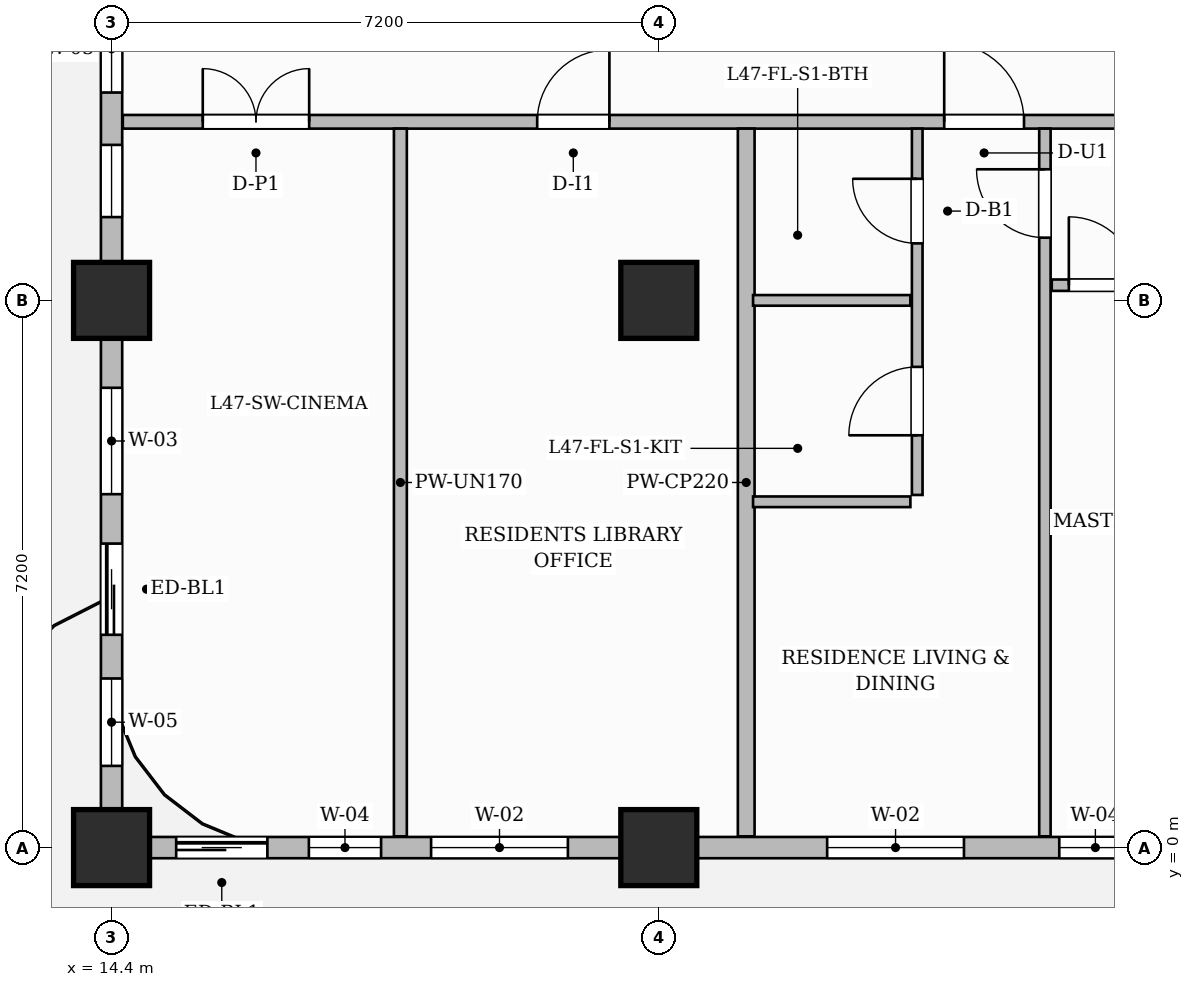
"""IFC4 building model, lengths in metres.
Left out: names, types, materials, properties, quantities, classifications, styles, units other than length and angle.
Written with IfcOpenShell. Run it as: python <this file> out.ifc"""

import sys

from ifc_helpers import new_model, si_unit, direction, frame, frame_2d, origin, origin_2d, place, context, subcontext, project, spatial, rectangle, extrude, source, transform, mapped, element, fill, save


model = new_model("IFC4")
c1 = context("Model", 3, precision=1e-05, world=origin(), true_north=direction((0.0, 1.0)))
c2 = subcontext(c1, "Body", "Model", "MODEL_VIEW")
j1 = project(units=[si_unit("LENGTHUNIT", "METRE"), si_unit("PLANEANGLEUNIT", "RADIAN")], contexts=[c1])
p1 = place(None, origin())
s1 = spatial("IfcSite", under=j1, at=p1, CompositionType="ELEMENT")
p2 = place(p1, origin())
s2 = spatial("IfcBuilding", under=s1, at=p2, CompositionType="ELEMENT")
p3 = place(p2, frame((0.0, 0.0, 188.8)))
s3 = spatial("IfcBuildingStorey", under=s2, at=p3, CompositionType="ELEMENT", Elevation=188.8)
m1 = source(origin(), c2, "Body", "SweptSolid", [
    extrude(rectangle(XDim=1.0, YDim=1.0, at=origin_2d()), origin(), (0.0, 0.0, 1.0), 3.85),
])
for number, where, z_axis, x_axis in (
    (1, (14.4, 0.0, 0.0), (0.0, 0.0, 1.0), (1.0, 0.0, 0.0)),
    (2, (14.4, 7.2, 0.0), (0.0, 0.0, 1.0), (1.0, 0.0, 0.0)),
    (3, (21.6, 0.0, 0.0), (0.0, 0.0, 1.0), (1.0, 0.0, 0.0)),
    (4, (21.6, 7.2, 0.0), (0.0, 0.0, 1.0), (1.0, 0.0, 0.0)),
):
    element("IfcColumn", number, at=place(p3, frame(where, z_axis=z_axis, x_axis=x_axis)), inside=s3, PredefinedType="COLUMN", context=c2, shape_type="MappedRepresentation", body=[
        mapped(m1, transform((0.0, 0.0, 0.0), scale=1.0)),
    ])
p4 = place(p3, frame((14.548, 9.55, 0.0), z_axis=(0.0, 0.0, 1.0), x_axis=(1.0, 0.0, 0.0)))
e5 = element("IfcWall", 5, at=p4, inside=s3, PredefinedType="PARTITIONING", context=c2, shape_type="SweptSolid", body=[
    extrude(rectangle(XDim=15.562, YDim=0.18, at=frame_2d((7.781, 0.0))), origin(), (0.0, 0.0, 1.0), 3.6),
])
p5 = place(p4, frame((1.052, 0.0, 0.0)))
e6 = element("IfcOpeningElement", 6, at=p5, cuts=e5, PredefinedType="OPENING", context=c2, shape_type="SweptSolid", body=[
    extrude(rectangle(XDim=1.4, YDim=2.35, at=frame_2d((0.7, 1.175))), frame((0.0, 0.1, 0.0), z_axis=(0.0, -1.0, 0.0), x_axis=(1.0, 0.0, 0.0)), (0.0, 0.0, 1.0), 0.2),
])
p6 = place(p4, frame((5.452, 0.0, 0.0)))
e7 = element("IfcOpeningElement", 7, at=p6, cuts=e5, PredefinedType="OPENING", context=c2, shape_type="SweptSolid", body=[
    extrude(rectangle(XDim=0.95, YDim=2.15, at=frame_2d((0.475, 1.075))), frame((0.0, 0.1, 0.0), z_axis=(0.0, -1.0, 0.0), x_axis=(1.0, 0.0, 0.0)), (0.0, 0.0, 1.0), 0.2),
])
p7 = place(p4, frame((10.807, 0.0, 0.0)))
e8 = element("IfcOpeningElement", 8, at=p7, cuts=e5, PredefinedType="OPENING", context=c2, shape_type="SweptSolid", body=[
    extrude(rectangle(XDim=1.05, YDim=2.25, at=frame_2d((0.525, 1.125))), frame((0.0, 0.1, 0.0), z_axis=(0.0, -1.0, 0.0), x_axis=(1.0, 0.0, 0.0)), (0.0, 0.0, 1.0), 0.2),
])
p8 = place(p3, frame((18.2, 0.148, 0.0), z_axis=(0.0, 0.0, 1.0), x_axis=(0.0, 1.0, 0.0)))
e9 = element("IfcWall", 9, at=p8, inside=s3, PredefinedType="PARTITIONING", context=c2, shape_type="SweptSolid", body=[
    extrude(rectangle(XDim=9.312, YDim=0.17, at=frame_2d((4.656, 0.0))), origin(), (0.0, 0.0, 1.0), 3.285),
])
p9 = place(p3, frame((22.75, 0.148, 0.0), z_axis=(0.0, 0.0, 1.0), x_axis=(0.0, 1.0, 0.0)))
e10 = element("IfcWall", 10, at=p9, inside=s3, PredefinedType="PARTITIONING", context=c2, shape_type="SweptSolid", body=[
    extrude(rectangle(XDim=9.312, YDim=0.22, at=frame_2d((4.656, 0.0))), origin(), (0.0, 0.0, 1.0), 3.6),
])
p10 = place(p3, frame((25.0, 4.64, 0.0), z_axis=(0.0, 0.0, 1.0), x_axis=(0.0, 1.0, 0.0)))
e11 = element("IfcWall", 11, at=p10, inside=s3, PredefinedType="PARTITIONING", context=c2, shape_type="SweptSolid", body=[
    extrude(rectangle(XDim=4.82, YDim=0.14, at=frame_2d((2.41, 0.0))), origin(), (0.0, 0.0, 1.0), 3.285),
])
p11 = place(p10, frame((0.785, 0.0, 0.0)))
e12 = element("IfcOpeningElement", 12, at=p11, cuts=e11, PredefinedType="OPENING", context=c2, shape_type="SweptSolid", body=[
    extrude(rectangle(XDim=0.9, YDim=2.15, at=frame_2d((0.45, 1.075))), frame((0.0, 0.08, 0.0), z_axis=(0.0, -1.0, 0.0), x_axis=(1.0, 0.0, 0.0)), (0.0, 0.0, 1.0), 0.16),
])
p12 = place(p10, frame((3.31, 0.0, 0.0)))
e13 = element("IfcOpeningElement", 13, at=p12, cuts=e11, PredefinedType="OPENING", context=c2, shape_type="SweptSolid", body=[
    extrude(rectangle(XDim=0.85, YDim=2.1, at=frame_2d((0.425, 1.05))), frame((0.0, 0.08, 0.0), z_axis=(0.0, -1.0, 0.0), x_axis=(1.0, 0.0, 0.0)), (0.0, 0.0, 1.0), 0.16),
])
p13 = place(p3, frame((22.84, 7.2, 0.0), z_axis=(0.0, 0.0, 1.0), x_axis=(1.0, 0.0, 0.0)))
e14 = element("IfcWall", 14, at=p13, inside=s3, PredefinedType="PARTITIONING", context=c2, shape_type="SweptSolid", body=[
    extrude(rectangle(XDim=2.07, YDim=0.14, at=frame_2d((1.035, 0.0))), origin(), (0.0, 0.0, 1.0), 3.085),
])
p14 = place(p3, frame((22.84, 4.55, 0.0), z_axis=(0.0, 0.0, 1.0), x_axis=(1.0, 0.0, 0.0)))
e15 = element("IfcWall", 15, at=p14, inside=s3, PredefinedType="PARTITIONING", context=c2, shape_type="SweptSolid", body=[
    extrude(rectangle(XDim=2.07, YDim=0.14, at=frame_2d((1.035, 0.0))), origin(), (0.0, 0.0, 1.0), 3.6),
])
p15 = place(p3, frame((26.68, 0.148, 0.0), z_axis=(0.0, 0.0, 1.0), x_axis=(0.0, 1.0, 0.0)))
e16 = element("IfcWall", 16, at=p15, inside=s3, PredefinedType="PARTITIONING", context=c2, shape_type="SweptSolid", body=[
    extrude(rectangle(XDim=9.312, YDim=0.15, at=frame_2d((4.656, 0.0))), origin(), (0.0, 0.0, 1.0), 3.6),
])
p16 = place(p15, frame((7.877, 0.0, 0.0)))
e17 = element("IfcOpeningElement", 17, at=p16, cuts=e16, PredefinedType="OPENING", context=c2, shape_type="SweptSolid", body=[
    extrude(rectangle(XDim=0.9, YDim=2.15, at=frame_2d((0.45, 1.075))), frame((0.0, 0.085, 0.0), z_axis=(0.0, -1.0, 0.0), x_axis=(1.0, 0.0, 0.0)), (0.0, 0.0, 1.0), 0.17),
])
p17 = place(p3, frame((26.77, 7.4, 0.0), z_axis=(0.0, 0.0, 1.0), x_axis=(1.0, 0.0, 0.0)))
e18 = element("IfcWall", 18, at=p17, inside=s3, PredefinedType="PARTITIONING", context=c2, shape_type="SweptSolid", body=[
    extrude(rectangle(XDim=3.34, YDim=0.15, at=frame_2d((1.67, 0.0))), origin(), (0.0, 0.0, 1.0), 3.085),
])
p18 = place(p17, frame((0.225, 0.0, 0.0)))
e19 = element("IfcOpeningElement", 19, at=p18, cuts=e18, PredefinedType="OPENING", context=c2, shape_type="SweptSolid", body=[
    extrude(rectangle(XDim=0.9, YDim=2.15, at=frame_2d((0.45, 1.075))), frame((0.0, 0.085, 0.0), z_axis=(0.0, -1.0, 0.0), x_axis=(1.0, 0.0, 0.0)), (0.0, 0.0, 1.0), 0.17),
])
p19 = place(p3, frame((14.4, 0.0, 0.0), z_axis=(0.0, 0.0, 1.0), x_axis=(1.0, 0.0, 0.0)))
e20 = element("IfcWall", 20, at=p19, inside=s3, PredefinedType="SOLIDWALL", context=c2, shape_type="SweptSolid", body=[
    extrude(rectangle(XDim=35.4, YDim=0.28, at=frame_2d((17.7, 0.0))), origin(), (0.0, 0.0, 1.0), 3.085),
])
p20 = place(p19, frame((0.85, 0.0, 0.0)))
e21 = element("IfcOpeningElement", 21, at=p20, cuts=e20, PredefinedType="OPENING", context=c2, shape_type="SweptSolid", body=[
    extrude(rectangle(XDim=1.2, YDim=2.2, at=frame_2d((0.6, 1.1))), frame((0.0, 0.15, 0.0), z_axis=(0.0, -1.0, 0.0), x_axis=(1.0, 0.0, 0.0)), (0.0, 0.0, 1.0), 0.3),
])
p21 = place(p19, frame((2.596, 0.0, 0.8)))
e22 = element("IfcOpeningElement", 22, at=p21, cuts=e20, PredefinedType="OPENING", context=c2, shape_type="SweptSolid", body=[
    extrude(rectangle(XDim=0.95, YDim=1.75, at=frame_2d((0.475, 0.875))), frame((0.0, 0.15, 0.0), z_axis=(0.0, -1.0, 0.0), x_axis=(1.0, 0.0, 0.0)), (0.0, 0.0, 1.0), 0.3),
])
p22 = place(p19, frame((4.204, 0.0, 0.8)))
e23 = element("IfcOpeningElement", 23, at=p22, cuts=e20, PredefinedType="OPENING", context=c2, shape_type="SweptSolid", body=[
    extrude(rectangle(XDim=1.8, YDim=1.85, at=frame_2d((0.9, 0.925))), frame((0.0, 0.15, 0.0), z_axis=(0.0, -1.0, 0.0), x_axis=(1.0, 0.0, 0.0)), (0.0, 0.0, 1.0), 0.3),
])
p23 = place(p19, frame((9.415, 0.0, 0.8)))
e24 = element("IfcOpeningElement", 24, at=p23, cuts=e20, PredefinedType="OPENING", context=c2, shape_type="SweptSolid", body=[
    extrude(rectangle(XDim=1.8, YDim=1.85, at=frame_2d((0.9, 0.925))), frame((0.0, 0.15, 0.0), z_axis=(0.0, -1.0, 0.0), x_axis=(1.0, 0.0, 0.0)), (0.0, 0.0, 1.0), 0.3),
])
p24 = place(p19, frame((12.469, 0.0, 0.8)))
e25 = element("IfcOpeningElement", 25, at=p24, cuts=e20, PredefinedType="OPENING", context=c2, shape_type="SweptSolid", body=[
    extrude(rectangle(XDim=0.95, YDim=1.75, at=frame_2d((0.475, 0.875))), frame((0.0, 0.15, 0.0), z_axis=(0.0, -1.0, 0.0), x_axis=(1.0, 0.0, 0.0)), (0.0, 0.0, 1.0), 0.3),
])
p25 = place(p19, frame((16.804, 0.0, 0.8)))
e26 = element("IfcOpeningElement", 26, at=p25, cuts=e20, PredefinedType="OPENING", context=c2, shape_type="SweptSolid", body=[
    extrude(rectangle(XDim=1.8, YDim=1.85, at=frame_2d((0.9, 0.925))), frame((0.0, 0.15, 0.0), z_axis=(0.0, -1.0, 0.0), x_axis=(1.0, 0.0, 0.0)), (0.0, 0.0, 1.0), 0.3),
])
p26 = place(p19, frame((21.521, 0.0, 0.8)))
e27 = element("IfcOpeningElement", 27, at=p26, cuts=e20, PredefinedType="OPENING", context=c2, shape_type="SweptSolid", body=[
    extrude(rectangle(XDim=0.95, YDim=1.75, at=frame_2d((0.475, 0.875))), frame((0.0, 0.15, 0.0), z_axis=(0.0, -1.0, 0.0), x_axis=(1.0, 0.0, 0.0)), (0.0, 0.0, 1.0), 0.3),
])
p27 = place(p19, frame((23.904, 0.0, 0.8)))
e28 = element("IfcOpeningElement", 28, at=p27, cuts=e20, PredefinedType="OPENING", context=c2, shape_type="SweptSolid", body=[
    extrude(rectangle(XDim=1.8, YDim=1.85, at=frame_2d((0.9, 0.925))), frame((0.0, 0.15, 0.0), z_axis=(0.0, -1.0, 0.0), x_axis=(1.0, 0.0, 0.0)), (0.0, 0.0, 1.0), 0.3),
])
p28 = place(p19, frame((29.681, 0.0, 0.8)))
e29 = element("IfcOpeningElement", 29, at=p28, cuts=e20, PredefinedType="OPENING", context=c2, shape_type="SweptSolid", body=[
    extrude(rectangle(XDim=1.8, YDim=1.85, at=frame_2d((0.9, 0.925))), frame((0.0, 0.15, 0.0), z_axis=(0.0, -1.0, 0.0), x_axis=(1.0, 0.0, 0.0)), (0.0, 0.0, 1.0), 0.3),
])
p29 = place(p19, frame((32.327, 0.0, 0.8)))
e30 = element("IfcOpeningElement", 30, at=p29, cuts=e20, PredefinedType="OPENING", context=c2, shape_type="SweptSolid", body=[
    extrude(rectangle(XDim=1.8, YDim=1.85, at=frame_2d((0.9, 0.925))), frame((0.0, 0.15, 0.0), z_axis=(0.0, -1.0, 0.0), x_axis=(1.0, 0.0, 0.0)), (0.0, 0.0, 1.0), 0.3),
])
p30 = place(p3, frame((14.4, 0.05, 0.0), z_axis=(0.0, 0.0, 1.0), x_axis=(0.0, 1.0, 0.0)))
e31 = element("IfcWall", 31, at=p30, inside=s3, PredefinedType="SOLIDWALL", context=c2, shape_type="SweptSolid", body=[
    extrude(rectangle(XDim=25.1, YDim=0.28, at=frame_2d((12.55, 0.0))), origin(), (0.0, 0.0, 1.0), 3.085),
])
p31 = place(p30, frame((2.75, 0.0, 0.0)))
e32 = element("IfcOpeningElement", 32, at=p31, cuts=e31, PredefinedType="OPENING", context=c2, shape_type="SweptSolid", body=[
    extrude(rectangle(XDim=1.2, YDim=2.2, at=frame_2d((0.6, 1.1))), frame((0.0, 0.15, 0.0), z_axis=(0.0, -1.0, 0.0), x_axis=(1.0, 0.0, 0.0)), (0.0, 0.0, 1.0), 0.3),
])
p32 = place(p30, frame((1.025, 0.0, 0.8)))
e33 = element("IfcOpeningElement", 33, at=p32, cuts=e31, PredefinedType="OPENING", context=c2, shape_type="SweptSolid", body=[
    extrude(rectangle(XDim=1.15, YDim=1.8, at=frame_2d((0.575, 0.9))), frame((0.0, 0.15, 0.0), z_axis=(0.0, -1.0, 0.0), x_axis=(1.0, 0.0, 0.0)), (0.0, 0.0, 1.0), 0.3),
])
p33 = place(p30, frame((4.6, 0.0, 0.8)))
e34 = element("IfcOpeningElement", 34, at=p33, cuts=e31, PredefinedType="OPENING", context=c2, shape_type="SweptSolid", body=[
    extrude(rectangle(XDim=1.4, YDim=1.85, at=frame_2d((0.7, 0.925))), frame((0.0, 0.15, 0.0), z_axis=(0.0, -1.0, 0.0), x_axis=(1.0, 0.0, 0.0)), (0.0, 0.0, 1.0), 0.3),
])
p34 = place(p30, frame((8.246, 0.0, 0.8)))
e35 = element("IfcOpeningElement", 35, at=p34, cuts=e31, PredefinedType="OPENING", context=c2, shape_type="SweptSolid", body=[
    extrude(rectangle(XDim=0.95, YDim=1.75, at=frame_2d((0.475, 0.875))), frame((0.0, 0.15, 0.0), z_axis=(0.0, -1.0, 0.0), x_axis=(1.0, 0.0, 0.0)), (0.0, 0.0, 1.0), 0.3),
])
p35 = place(p30, frame((9.885, 0.0, 0.8)))
e36 = element("IfcOpeningElement", 36, at=p35, cuts=e31, PredefinedType="OPENING", context=c2, shape_type="SweptSolid", body=[
    extrude(rectangle(XDim=1.15, YDim=1.8, at=frame_2d((0.575, 0.9))), frame((0.0, 0.15, 0.0), z_axis=(0.0, -1.0, 0.0), x_axis=(1.0, 0.0, 0.0)), (0.0, 0.0, 1.0), 0.3),
])
p36 = place(p30, frame((11.789, 0.0, 0.8)))
e37 = element("IfcOpeningElement", 37, at=p36, cuts=e31, PredefinedType="OPENING", context=c2, shape_type="SweptSolid", body=[
    extrude(rectangle(XDim=1.4, YDim=1.85, at=frame_2d((0.7, 0.925))), frame((0.0, 0.15, 0.0), z_axis=(0.0, -1.0, 0.0), x_axis=(1.0, 0.0, 0.0)), (0.0, 0.0, 1.0), 0.3),
])
p37 = place(p30, frame((15.675, 0.0, 0.8)))
e38 = element("IfcOpeningElement", 38, at=p37, cuts=e31, PredefinedType="OPENING", context=c2, shape_type="SweptSolid", body=[
    extrude(rectangle(XDim=1.8, YDim=1.85, at=frame_2d((0.9, 0.925))), frame((0.0, 0.15, 0.0), z_axis=(0.0, -1.0, 0.0), x_axis=(1.0, 0.0, 0.0)), (0.0, 0.0, 1.0), 0.3),
])
p38 = place(p30, frame((18.425, 0.0, 0.8)))
e39 = element("IfcOpeningElement", 39, at=p38, cuts=e31, PredefinedType="OPENING", context=c2, shape_type="SweptSolid", body=[
    extrude(rectangle(XDim=1.8, YDim=1.85, at=frame_2d((0.9, 0.925))), frame((0.0, 0.15, 0.0), z_axis=(0.0, -1.0, 0.0), x_axis=(1.0, 0.0, 0.0)), (0.0, 0.0, 1.0), 0.3),
])
p39 = place(p30, frame((22.65, 0.0, 0.8)))
e40 = element("IfcOpeningElement", 40, at=p39, cuts=e31, PredefinedType="OPENING", context=c2, shape_type="SweptSolid", body=[
    extrude(rectangle(XDim=1.4, YDim=1.85, at=frame_2d((0.7, 0.925))), frame((0.0, 0.15, 0.0), z_axis=(0.0, -1.0, 0.0), x_axis=(1.0, 0.0, 0.0)), (0.0, 0.0, 1.0), 0.3),
])
m2 = source(origin(), c2, "Body", "SweptSolid", [
    extrude(rectangle(XDim=1.4, YDim=2.35, at=frame_2d((0.7, 1.175))), frame((0.0, 0.025, 0.0), z_axis=(0.0, -1.0, 0.0), x_axis=(1.0, 0.0, 0.0)), (0.0, 0.0, 1.0), 0.05),
])
p40 = place(p5, origin())
e41 = element("IfcDoor", 41, at=p40, inside=s3, OperationType="DOUBLE_DOOR_SINGLE_SWING", PredefinedType="DOOR", context=c2, shape_type="MappedRepresentation", body=[
    mapped(m2, transform((0.0, 0.0, 0.0), scale=1.0)),
])
fill(e6, e41)
m3 = source(origin(), c2, "Body", "SweptSolid", [
    extrude(rectangle(XDim=0.95, YDim=2.15, at=frame_2d((0.475, 1.075))), frame((0.0, 0.025, 0.0), z_axis=(0.0, -1.0, 0.0), x_axis=(1.0, 0.0, 0.0)), (0.0, 0.0, 1.0), 0.05),
])
p41 = place(p6, origin())
e42 = element("IfcDoor", 42, at=p41, inside=s3, OperationType="SINGLE_SWING_RIGHT", PredefinedType="DOOR", context=c2, shape_type="MappedRepresentation", body=[
    mapped(m3, transform((0.0, 0.0, 0.0), scale=1.0)),
])
fill(e7, e42)
m4 = source(origin(), c2, "Body", "SweptSolid", [
    extrude(rectangle(XDim=0.9, YDim=2.15, at=frame_2d((0.45, 1.075))), frame((0.0, 0.025, 0.0), z_axis=(0.0, -1.0, 0.0), x_axis=(1.0, 0.0, 0.0)), (0.0, 0.0, 1.0), 0.05),
])
p42 = place(p11, origin())
e43 = element("IfcDoor", 43, at=p42, inside=s3, OperationType="SINGLE_SWING_LEFT", PredefinedType="DOOR", context=c2, shape_type="MappedRepresentation", body=[
    mapped(m4, transform((0.0, 0.0, 0.0), scale=1.0)),
])
fill(e12, e43)
m5 = source(origin(), c2, "Body", "SweptSolid", [
    extrude(rectangle(XDim=0.85, YDim=2.1, at=frame_2d((0.425, 1.05))), frame((0.0, 0.025, 0.0), z_axis=(0.0, -1.0, 0.0), x_axis=(1.0, 0.0, 0.0)), (0.0, 0.0, 1.0), 0.05),
])
p43 = place(p12, origin())
e44 = element("IfcDoor", 44, at=p43, inside=s3, OperationType="SINGLE_SWING_RIGHT", PredefinedType="DOOR", context=c2, shape_type="MappedRepresentation", body=[
    mapped(m5, transform((0.0, 0.0, 0.0), scale=1.0)),
])
fill(e13, e44)
m6 = source(origin(), c2, "Body", "SweptSolid", [
    extrude(rectangle(XDim=1.05, YDim=2.25, at=frame_2d((0.525, 1.125))), frame((0.0, 0.025, 0.0), z_axis=(0.0, -1.0, 0.0), x_axis=(1.0, 0.0, 0.0)), (0.0, 0.0, 1.0), 0.05),
])
p44 = place(p7, origin())
e45 = element("IfcDoor", 45, at=p44, inside=s3, OperationType="SINGLE_SWING_LEFT", PredefinedType="DOOR", context=c2, shape_type="MappedRepresentation", body=[
    mapped(m6, transform((0.0, 0.0, 0.0), scale=1.0)),
])
fill(e8, e45)
p45 = place(p16, origin())
e46 = element("IfcDoor", 46, at=p45, inside=s3, OperationType="SINGLE_SWING_RIGHT", PredefinedType="DOOR", context=c2, shape_type="MappedRepresentation", body=[
    mapped(m4, transform((0.0, 0.0, 0.0), scale=1.0)),
])
fill(e17, e46)
p46 = place(p18, origin())
e47 = element("IfcDoor", 47, at=p46, inside=s3, OperationType="SINGLE_SWING_LEFT", PredefinedType="DOOR", context=c2, shape_type="MappedRepresentation", body=[
    mapped(m4, transform((0.0, 0.0, 0.0), scale=1.0)),
])
fill(e19, e47)
m7 = source(origin(), c2, "Body", "SweptSolid", [
    extrude(rectangle(XDim=1.2, YDim=2.2, at=frame_2d((0.6, 1.1))), frame((0.0, 0.025, 0.0), z_axis=(0.0, -1.0, 0.0), x_axis=(1.0, 0.0, 0.0)), (0.0, 0.0, 1.0), 0.05),
])
p47 = place(p20, origin())
e48 = element("IfcDoor", 48, at=p47, inside=s3, OperationType="SLIDING_TO_LEFT", PredefinedType="DOOR", context=c2, shape_type="MappedRepresentation", body=[
    mapped(m7, transform((0.0, 0.0, 0.0), scale=1.0)),
])
fill(e21, e48)
p48 = place(p31, origin())
e49 = element("IfcDoor", 49, at=p48, inside=s3, OperationType="SLIDING_TO_LEFT", PredefinedType="DOOR", context=c2, shape_type="MappedRepresentation", body=[
    mapped(m7, transform((0.0, 0.0, 0.0), scale=1.0)),
])
fill(e32, e49)
m8 = source(origin(), c2, "Body", "SweptSolid", [
    extrude(rectangle(XDim=0.95, YDim=1.75, at=frame_2d((0.475, 0.875))), frame((0.0, 0.03, 0.0), z_axis=(0.0, -1.0, 0.0), x_axis=(1.0, 0.0, 0.0)), (0.0, 0.0, 1.0), 0.06),
])
p49 = place(p21, origin())
e50 = element("IfcWindow", 50, at=p49, inside=s3, PartitioningType="SINGLE_PANEL", PredefinedType="WINDOW", context=c2, shape_type="MappedRepresentation", body=[
    mapped(m8, transform((0.0, 0.0, 0.0), scale=1.0)),
])
fill(e22, e50)
m9 = source(origin(), c2, "Body", "SweptSolid", [
    extrude(rectangle(XDim=1.8, YDim=1.85, at=frame_2d((0.9, 0.925))), frame((0.0, 0.03, 0.0), z_axis=(0.0, -1.0, 0.0), x_axis=(1.0, 0.0, 0.0)), (0.0, 0.0, 1.0), 0.06),
])
p50 = place(p22, origin())
e51 = element("IfcWindow", 51, at=p50, inside=s3, PartitioningType="DOUBLE_PANEL_VERTICAL", PredefinedType="WINDOW", context=c2, shape_type="MappedRepresentation", body=[
    mapped(m9, transform((0.0, 0.0, 0.0), scale=1.0)),
])
fill(e23, e51)
p51 = place(p23, origin())
e52 = element("IfcWindow", 52, at=p51, inside=s3, PartitioningType="DOUBLE_PANEL_VERTICAL", PredefinedType="WINDOW", context=c2, shape_type="MappedRepresentation", body=[
    mapped(m9, transform((0.0, 0.0, 0.0), scale=1.0)),
])
fill(e24, e52)
p52 = place(p24, origin())
e53 = element("IfcWindow", 53, at=p52, inside=s3, PartitioningType="SINGLE_PANEL", PredefinedType="WINDOW", context=c2, shape_type="MappedRepresentation", body=[
    mapped(m8, transform((0.0, 0.0, 0.0), scale=1.0)),
])
fill(e25, e53)
m10 = source(origin(), c2, "Body", "SweptSolid", [
    extrude(rectangle(XDim=1.15, YDim=1.8, at=frame_2d((0.575, 0.9))), frame((0.0, 0.03, 0.0), z_axis=(0.0, -1.0, 0.0), x_axis=(1.0, 0.0, 0.0)), (0.0, 0.0, 1.0), 0.06),
])
p53 = place(p32, origin())
e54 = element("IfcWindow", 54, at=p53, inside=s3, PartitioningType="SINGLE_PANEL", PredefinedType="WINDOW", context=c2, shape_type="MappedRepresentation", body=[
    mapped(m10, transform((0.0, 0.0, 0.0), scale=1.0)),
])
fill(e33, e54)
m11 = source(origin(), c2, "Body", "SweptSolid", [
    extrude(rectangle(XDim=1.4, YDim=1.85, at=frame_2d((0.7, 0.925))), frame((0.0, 0.03, 0.0), z_axis=(0.0, -1.0, 0.0), x_axis=(1.0, 0.0, 0.0)), (0.0, 0.0, 1.0), 0.06),
])
p54 = place(p33, origin())
e55 = element("IfcWindow", 55, at=p54, inside=s3, PartitioningType="SINGLE_PANEL", PredefinedType="WINDOW", context=c2, shape_type="MappedRepresentation", body=[
    mapped(m11, transform((0.0, 0.0, 0.0), scale=1.0)),
])
fill(e34, e55)
p55 = place(p34, origin())
e56 = element("IfcWindow", 56, at=p55, inside=s3, PartitioningType="SINGLE_PANEL", PredefinedType="WINDOW", context=c2, shape_type="MappedRepresentation", body=[
    mapped(m8, transform((0.0, 0.0, 0.0), scale=1.0)),
])
fill(e35, e56)
p56 = place(p35, origin())
e57 = element("IfcWindow", 57, at=p56, inside=s3, PartitioningType="SINGLE_PANEL", PredefinedType="WINDOW", context=c2, shape_type="MappedRepresentation", body=[
    mapped(m10, transform((0.0, 0.0, 0.0), scale=1.0)),
])
fill(e36, e57)
save(model, sys.argv[1])
